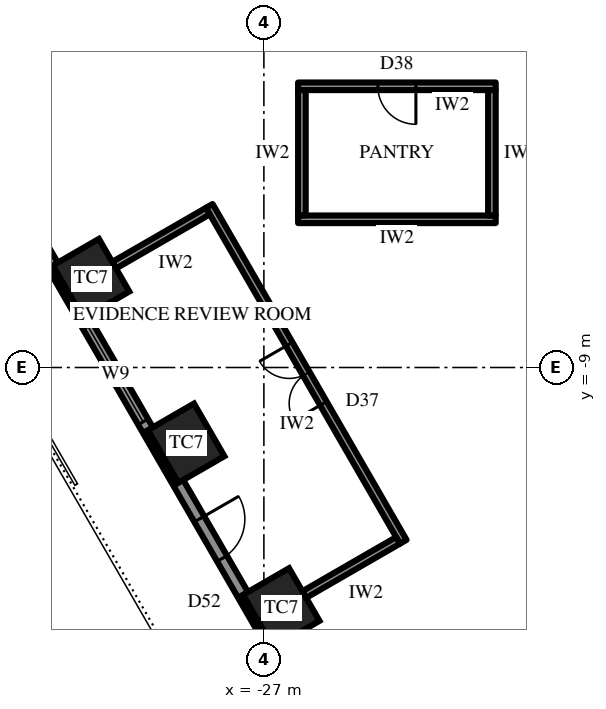
"""IFC4 building model, lengths in metres.
Left out: names, types, materials, properties, quantities, classifications, styles, units other than length and angle.
Written with IfcOpenShell. Run it as: python <this file> out.ifc"""

import sys

from ifc_helpers import new_model, si_unit, direction, frame, frame_2d, origin, origin_2d, place, context, subcontext, project, spatial, rectangle, extrude, element, fill, save


model = new_model("IFC4")
c1 = context("Model", 3, precision=1e-05, world=origin(), true_north=direction((0.0, 1.0)))
c2 = subcontext(c1, "Body", "Model", "MODEL_VIEW")
j1 = project(units=[si_unit("LENGTHUNIT", "METRE"), si_unit("PLANEANGLEUNIT", "RADIAN")], contexts=[c1])
p1 = place(None, origin())
s1 = spatial("IfcSite", under=j1, at=p1, CompositionType="ELEMENT")
p2 = place(p1, origin())
s2 = spatial("IfcBuilding", under=s1, at=p2, CompositionType="ELEMENT")
p3 = place(p2, frame((0.0, 0.0, 169.9)))
s3 = spatial("IfcBuildingStorey", under=s2, at=p3, CompositionType="ELEMENT", Elevation=169.9)
for number, where, z_axis, x_axis in (
    (1, (-31.547, -6.658, 0.0), (0.0, 0.0, 1.0), (0.5, -0.866, 0.0)),
    (2, (-29.045, -10.992, 0.0), (0.0, 0.0, 1.0), (0.5, -0.866, 0.0)),
    (3, (-26.544, -15.325, 0.0), (0.0, 0.0, 1.0), (0.5, -0.866, 0.0)),
):
    element("IfcColumn", number, at=place(p3, frame(where, z_axis=z_axis, x_axis=x_axis)), inside=s3, PredefinedType="COLUMN", context=c2, shape_type="SweptSolid", body=[
        extrude(rectangle(XDim=1.6, YDim=1.4, at=origin_2d()), origin(), (0.0, 0.0, 1.0), 4.2),
    ])
p4 = place(p3, frame((-34.656, -2.675, 0.0), z_axis=(0.0, 0.0, 1.0), x_axis=(0.500003084452, -0.866023622968, 0.0)))
e4 = element("IfcWall", 4, at=p4, inside=s3, PredefinedType="SOLIDWALL", context=c2, shape_type="SweptSolid", body=[
    extrude(rectangle(XDim=30.022, YDim=0.3, at=frame_2d((15.011, 0.0))), origin(), (0.0, 0.0, 1.0), 2.75),
])
p5 = place(p4, frame((1.052, 0.0, 0.6)))
e5 = element("IfcOpeningElement", 5, at=p5, cuts=e4, PredefinedType="OPENING", context=c2, shape_type="SweptSolid", body=[
    extrude(rectangle(XDim=2.9, YDim=1.9, at=frame_2d((1.45, 0.95))), frame((0.0, 0.16, 0.0), z_axis=(0.0, -1.0, 0.0), x_axis=(1.0, 0.0, 0.0)), (0.0, 0.0, 1.0), 0.32),
])
p6 = place(p4, frame((6.056, 0.0, 0.6)))
e6 = element("IfcOpeningElement", 6, at=p6, cuts=e4, PredefinedType="OPENING", context=c2, shape_type="SweptSolid", body=[
    extrude(rectangle(XDim=2.9, YDim=1.9, at=frame_2d((1.45, 0.95))), frame((0.0, 0.16, 0.0), z_axis=(0.0, -1.0, 0.0), x_axis=(1.0, 0.0, 0.0)), (0.0, 0.0, 1.0), 0.32),
])
p7 = place(p4, frame((11.909, 0.0, 0.0)))
e7 = element("IfcOpeningElement", 7, at=p7, cuts=e4, PredefinedType="OPENING", context=c2, shape_type="SweptSolid", body=[
    extrude(rectangle(XDim=1.2, YDim=2.4, at=frame_2d((0.6, 1.2))), frame((0.0, 0.16, 0.0), z_axis=(0.0, -1.0, 0.0), x_axis=(1.0, 0.0, 0.0)), (0.0, 0.0, 1.0), 0.32),
])
p8 = place(p4, frame((16.063, 0.0, 0.6)))
e8 = element("IfcOpeningElement", 8, at=p8, cuts=e4, PredefinedType="OPENING", context=c2, shape_type="SweptSolid", body=[
    extrude(rectangle(XDim=2.9, YDim=1.9, at=frame_2d((1.45, 0.95))), frame((0.0, 0.16, 0.0), z_axis=(0.0, -1.0, 0.0), x_axis=(1.0, 0.0, 0.0)), (0.0, 0.0, 1.0), 0.32),
])
p9 = place(p4, frame((21.067, 0.0, 0.6)))
e9 = element("IfcOpeningElement", 9, at=p9, cuts=e4, PredefinedType="OPENING", context=c2, shape_type="SweptSolid", body=[
    extrude(rectangle(XDim=2.9, YDim=1.9, at=frame_2d((1.45, 0.95))), frame((0.0, 0.16, 0.0), z_axis=(0.0, -1.0, 0.0), x_axis=(1.0, 0.0, 0.0)), (0.0, 0.0, 1.0), 0.32),
])
p10 = place(p4, frame((26.07, 0.0, 0.6)))
e10 = element("IfcOpeningElement", 10, at=p10, cuts=e4, PredefinedType="OPENING", context=c2, shape_type="SweptSolid", body=[
    extrude(rectangle(XDim=2.9, YDim=1.9, at=frame_2d((1.45, 0.95))), frame((0.0, 0.16, 0.0), z_axis=(0.0, -1.0, 0.0), x_axis=(1.0, 0.0, 0.0)), (0.0, 0.0, 1.0), 0.32),
])
p11 = place(p3, frame((-28.436, -4.747, 0.0), z_axis=(0.0, 0.0, 1.0), x_axis=(0.499987468925, -0.866032638483, 0.0)))
e11 = element("IfcWall", 11, at=p11, inside=s3, PredefinedType="PARTITIONING", context=c2, shape_type="SweptSolid", body=[
    extrude(rectangle(XDim=10.207, YDim=0.2, at=frame_2d((5.104, 0.0))), origin(), (0.0, 0.0, 1.0), 4.0),
])
p12 = place(p11, frame((4.204, 0.0, 0.0)))
e12 = element("IfcOpeningElement", 12, at=p12, cuts=e11, PredefinedType="OPENING", context=c2, shape_type="SweptSolid", body=[
    extrude(rectangle(XDim=1.8, YDim=2.4, at=frame_2d((0.9, 1.2))), frame((0.0, 0.11, 0.0), z_axis=(0.0, -1.0, 0.0), x_axis=(1.0, 0.0, 0.0)), (0.0, 0.0, 1.0), 0.22),
])
p13 = place(p3, frame((-28.473, -4.883, 0.0), z_axis=(0.0, 0.0, 1.0), x_axis=(-0.866025820012, -0.499999279071, 0.0)))
e13 = element("IfcWall", 13, at=p13, inside=s3, PredefinedType="PARTITIONING", context=c2, shape_type="SweptSolid", body=[
    extrude(rectangle(XDim=2.85, YDim=0.2, at=frame_2d((1.425, 0.0))), origin(), (0.0, 0.0, 1.0), 3.082),
])
p14 = place(p3, frame((-23.469, -13.55, 0.0), z_axis=(0.0, 0.0, 1.0), x_axis=(-0.866025820012, -0.499999279071, 0.0)))
e14 = element("IfcWall", 14, at=p14, inside=s3, PredefinedType="PARTITIONING", context=c2, shape_type="SweptSolid", body=[
    extrude(rectangle(XDim=2.85, YDim=0.2, at=frame_2d((1.425, 0.0))), origin(), (0.0, 0.0, 1.0), 4.0),
])
p15 = place(p3, frame((-20.9, -1.6, 0.0), z_axis=(0.0, 0.0, 1.0), x_axis=(-1.0, 0.0, 0.0)))
e15 = element("IfcWall", 15, at=p15, inside=s3, PredefinedType="PARTITIONING", context=c2, shape_type="SweptSolid", body=[
    extrude(rectangle(XDim=5.2, YDim=0.2, at=frame_2d((2.6, 0.0))), origin(), (0.0, 0.0, 1.0), 4.0),
])
p16 = place(p15, frame((2.1, 0.0, 0.0)))
e16 = element("IfcOpeningElement", 16, at=p16, cuts=e15, PredefinedType="OPENING", context=c2, shape_type="SweptSolid", body=[
    extrude(rectangle(XDim=1.0, YDim=2.2, at=frame_2d((0.5, 1.1))), frame((0.0, 0.11, 0.0), z_axis=(0.0, -1.0, 0.0), x_axis=(1.0, 0.0, 0.0)), (0.0, 0.0, 1.0), 0.22),
])
p17 = place(p3, frame((-20.9, -5.1, 0.0), z_axis=(0.0, 0.0, 1.0), x_axis=(-1.0, 0.0, 0.0)))
e17 = element("IfcWall", 17, at=p17, inside=s3, PredefinedType="PARTITIONING", context=c2, shape_type="SweptSolid", body=[
    extrude(rectangle(XDim=5.2, YDim=0.2, at=frame_2d((2.6, 0.0))), origin(), (0.0, 0.0, 1.0), 4.0),
])
for number, where, z_axis, x_axis in (
    (18, (-21.0, -1.7, 0.0), (0.0, 0.0, 1.0), (0.0, -1.0, 0.0)),
    (19, (-26.0, -1.7, 0.0), (0.0, 0.0, 1.0), (0.0, -1.0, 0.0)),
):
    element("IfcWall", number, at=place(p3, frame(where, z_axis=z_axis, x_axis=x_axis)), inside=s3, PredefinedType="PARTITIONING", context=c2, shape_type="SweptSolid", body=[
        extrude(rectangle(XDim=3.3, YDim=0.2, at=frame_2d((1.65, 0.0))), origin(), (0.0, 0.0, 1.0), 4.0),
    ])
p18 = place(p6, origin())
e20 = element("IfcWindow", 20, at=p18, inside=s3, PartitioningType="SINGLE_PANEL", PredefinedType="WINDOW", context=c2, shape_type="SweptSolid", body=[
    extrude(rectangle(XDim=2.9, YDim=1.9, at=frame_2d((1.45, 0.95))), frame((0.0, 0.03, 0.0), z_axis=(0.0, -1.0, 0.0), x_axis=(1.0, 0.0, 0.0)), (0.0, 0.0, 1.0), 0.06),
])
fill(e6, e20)
p19 = place(p7, origin())
e21 = element("IfcDoor", 21, at=p19, inside=s3, OperationType="SINGLE_SWING_RIGHT", PredefinedType="DOOR", context=c2, shape_type="SweptSolid", body=[
    extrude(rectangle(XDim=1.2, YDim=2.4, at=frame_2d((0.6, 1.2))), frame((0.0, 0.025, 0.0), z_axis=(0.0, -1.0, 0.0), x_axis=(1.0, 0.0, 0.0)), (0.0, 0.0, 1.0), 0.05),
])
fill(e7, e21)
p20 = place(p12, frame((1.8, 0.0, 0.0), z_axis=(0.0, 0.0, 1.0), x_axis=(-1.0, 0.0, 0.0)))
e22 = element("IfcDoor", 22, at=p20, inside=s3, OperationType="DOUBLE_DOOR_SINGLE_SWING", PredefinedType="DOOR", context=c2, shape_type="SweptSolid", body=[
    extrude(rectangle(XDim=1.8, YDim=2.4, at=frame_2d((0.9, 1.2))), frame((0.0, 0.025, 0.0), z_axis=(0.0, -1.0, 0.0), x_axis=(1.0, 0.0, 0.0)), (0.0, 0.0, 1.0), 0.05),
])
fill(e12, e22)
p21 = place(p16, origin())
e23 = element("IfcDoor", 23, at=p21, inside=s3, OperationType="SINGLE_SWING_RIGHT", PredefinedType="DOOR", context=c2, shape_type="SweptSolid", body=[
    extrude(rectangle(XDim=1.0, YDim=2.2, at=frame_2d((0.5, 1.1))), frame((0.0, 0.025, 0.0), z_axis=(0.0, -1.0, 0.0), x_axis=(1.0, 0.0, 0.0)), (0.0, 0.0, 1.0), 0.05),
])
fill(e16, e23)
save(model, sys.argv[1])
